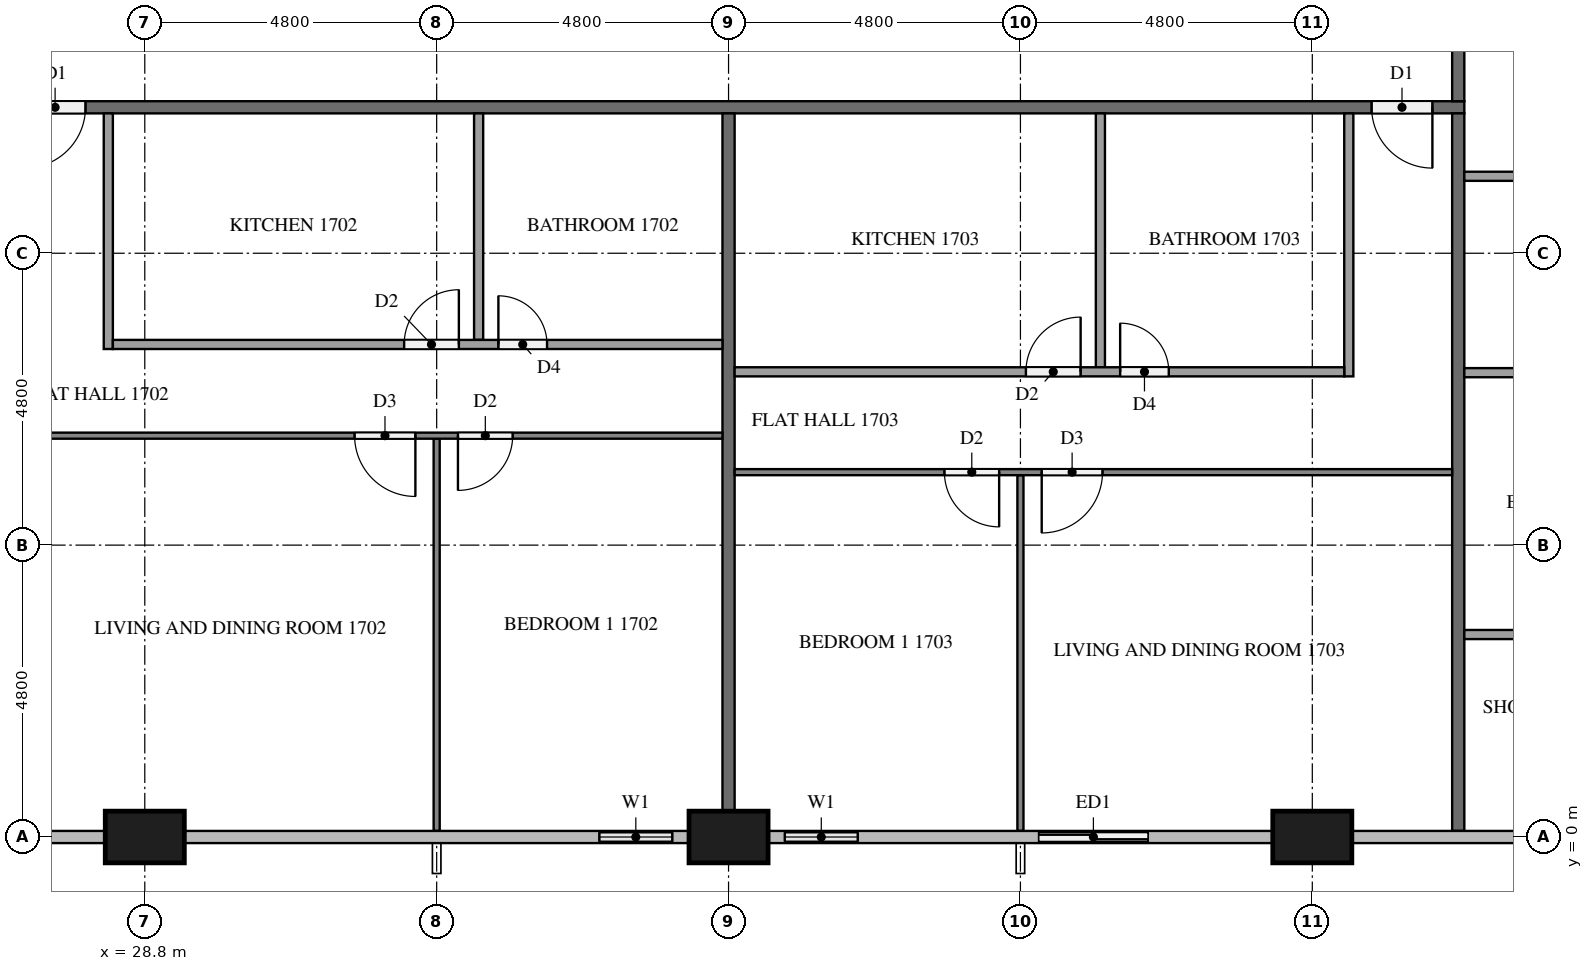
"""IFC4 building model, lengths in metres.
Left out: names, types, materials, properties, quantities, classifications, styles, units other than length and angle.
Written with IfcOpenShell. Run it as: python <this file> out.ifc"""

import sys

from ifc_helpers import new_model, si_unit, direction, frame, frame_2d, origin, origin_2d, place, context, subcontext, project, spatial, rectangle, extrude, element, fill, save


model = new_model("IFC4")
c1 = context("Model", 3, precision=1e-05, world=origin(), true_north=direction((0.0, 1.0)))
c2 = subcontext(c1, "Body", "Model", "MODEL_VIEW")
j1 = project(units=[si_unit("LENGTHUNIT", "METRE"), si_unit("PLANEANGLEUNIT", "RADIAN")], contexts=[c1])
p1 = place(None, origin())
s1 = spatial("IfcSite", under=j1, at=p1, CompositionType="ELEMENT")
p2 = place(p1, origin())
s2 = spatial("IfcBuilding", under=s1, at=p2, CompositionType="ELEMENT")
p3 = place(p2, frame((0.0, 0.0, 69.8)))
s3 = spatial("IfcBuildingStorey", under=s2, at=p3, CompositionType="ELEMENT", Elevation=69.8)
for number, where, z_axis, x_axis in (
    (1, (28.8, 0.0, 0.0), (0.0, 0.0, 1.0), (1.0, 0.0, 0.0)),
    (2, (38.4, 0.0, 0.0), (0.0, 0.0, 1.0), (1.0, 0.0, 0.0)),
    (3, (48.0, 0.0, 0.0), (0.0, 0.0, 1.0), (1.0, 0.0, 0.0)),
):
    element("IfcColumn", number, at=place(p3, frame(where, z_axis=z_axis, x_axis=x_axis)), inside=s3, PredefinedType="COLUMN", context=c2, shape_type="SweptSolid", body=[
        extrude(rectangle(XDim=1.3, YDim=0.85, at=origin_2d()), origin(), (0.0, 0.0, 1.0), 3.2),
    ])
p4 = place(p3, frame((36.0, 0.0, 0.0), z_axis=(0.0, 0.0, 1.0), x_axis=(1.0, 0.0, 0.0)))
e4 = element("IfcWall", 4, at=p4, inside=s3, PredefinedType="SOLIDWALL", context=c2, shape_type="SweptSolid", body=[
    extrude(rectangle(XDim=1.75, YDim=0.15, at=frame_2d((0.875, 0.0))), origin(), (0.0, 0.0, 1.0), 3.2),
])
p5 = place(p4, frame((0.275, 0.0, 0.9)))
e5 = element("IfcOpeningElement", 5, at=p5, cuts=e4, PredefinedType="OPENING", context=c2, shape_type="SweptSolid", body=[
    extrude(rectangle(XDim=1.2, YDim=1.4, at=frame_2d((0.6, 0.7))), frame((0.0, 0.085, 0.0), z_axis=(0.0, -1.0, 0.0), x_axis=(1.0, 0.0, 0.0)), (0.0, 0.0, 1.0), 0.17),
])
p6 = place(p3, frame((39.05, 0.0, 0.0), z_axis=(0.0, 0.0, 1.0), x_axis=(1.0, 0.0, 0.0)))
e6 = element("IfcWall", 6, at=p6, inside=s3, PredefinedType="SOLIDWALL", context=c2, shape_type="SweptSolid", body=[
    extrude(rectangle(XDim=1.75, YDim=0.15, at=frame_2d((0.875, 0.0))), origin(), (0.0, 0.0, 1.0), 3.2),
])
p7 = place(p6, frame((0.275, 0.0, 0.9)))
e7 = element("IfcOpeningElement", 7, at=p7, cuts=e6, PredefinedType="OPENING", context=c2, shape_type="SweptSolid", body=[
    extrude(rectangle(XDim=1.2, YDim=1.4, at=frame_2d((0.6, 0.7))), frame((0.0, 0.085, 0.0), z_axis=(0.0, -1.0, 0.0), x_axis=(1.0, 0.0, 0.0)), (0.0, 0.0, 1.0), 0.17),
])
p8 = place(p3, frame((43.2, 0.0, 0.0), z_axis=(0.0, 0.0, 1.0), x_axis=(1.0, 0.0, 0.0)))
e8 = element("IfcWall", 8, at=p8, inside=s3, PredefinedType="SOLIDWALL", context=c2, shape_type="SweptSolid", body=[
    extrude(rectangle(XDim=2.4, YDim=0.15, at=frame_2d((1.2, 0.0))), origin(), (0.0, 0.0, 1.0), 3.2),
])
p9 = place(p8, frame((0.3, 0.0, 0.0)))
e9 = element("IfcOpeningElement", 9, at=p9, cuts=e8, PredefinedType="OPENING", context=c2, shape_type="SweptSolid", body=[
    extrude(rectangle(XDim=1.8, YDim=2.4, at=frame_2d((0.9, 1.2))), frame((0.0, 0.085, 0.0), z_axis=(0.0, -1.0, 0.0), x_axis=(1.0, 0.0, 0.0)), (0.0, 0.0, 1.0), 0.17),
])
p10 = place(p3, frame((50.5, 12.0, 0.0), z_axis=(0.0, 0.0, 1.0), x_axis=(-1.0, 0.0, 0.0)))
e10 = element("IfcWall", 10, at=p10, inside=s3, PredefinedType="PARTITIONING", context=c2, shape_type="SweptSolid", body=[
    extrude(rectangle(XDim=38.6, YDim=0.2, at=frame_2d((19.3, 0.0))), origin(), (0.0, 0.0, 1.0), 3.2),
])
p11 = place(p10, frame((37.075, 0.0, 0.0)))
e11 = element("IfcOpeningElement", 11, at=p11, cuts=e10, PredefinedType="OPENING", context=c2, shape_type="SweptSolid", body=[
    extrude(rectangle(XDim=1.0, YDim=2.1, at=frame_2d((0.5, 1.05))), frame((0.0, 0.11, 0.0), z_axis=(0.0, -1.0, 0.0), x_axis=(1.0, 0.0, 0.0)), (0.0, 0.0, 1.0), 0.22),
])
p12 = place(p10, frame((22.675, 0.0, 0.0)))
e12 = element("IfcOpeningElement", 12, at=p12, cuts=e10, PredefinedType="OPENING", context=c2, shape_type="SweptSolid", body=[
    extrude(rectangle(XDim=1.0, YDim=2.1, at=frame_2d((0.5, 1.05))), frame((0.0, 0.11, 0.0), z_axis=(0.0, -1.0, 0.0), x_axis=(1.0, 0.0, 0.0)), (0.0, 0.0, 1.0), 0.22),
])
p13 = place(p10, frame((0.525, 0.0, 0.0)))
e13 = element("IfcOpeningElement", 13, at=p13, cuts=e10, PredefinedType="OPENING", context=c2, shape_type="SweptSolid", body=[
    extrude(rectangle(XDim=1.0, YDim=2.1, at=frame_2d((0.5, 1.05))), frame((0.0, 0.11, 0.0), z_axis=(0.0, -1.0, 0.0), x_axis=(1.0, 0.0, 0.0)), (0.0, 0.0, 1.0), 0.22),
])
p14 = place(p3, frame((50.4, 40.7, 0.0), z_axis=(0.0, 0.0, 1.0), x_axis=(0.0, -1.0, 0.0)))
e14 = element("IfcWall", 14, at=p14, inside=s3, PredefinedType="PARTITIONING", context=c2, shape_type="SweptSolid", body=[
    extrude(rectangle(XDim=28.6, YDim=0.2, at=frame_2d((14.3, 0.0))), origin(), (0.0, 0.0, 1.0), 3.2),
])
p15 = place(p14, frame((21.875, 0.0, 0.0)))
e15 = element("IfcOpeningElement", 15, at=p15, cuts=e14, PredefinedType="OPENING", context=c2, shape_type="SweptSolid", body=[
    extrude(rectangle(XDim=1.1, YDim=2.1, at=frame_2d((0.55, 1.05))), frame((0.0, 0.11, 0.0), z_axis=(0.0, -1.0, 0.0), x_axis=(1.0, 0.0, 0.0)), (0.0, 0.0, 1.0), 0.22),
])
p16 = place(p14, frame((20.075, 0.0, 0.0)))
e16 = element("IfcOpeningElement", 16, at=p16, cuts=e14, PredefinedType="OPENING", context=c2, shape_type="SweptSolid", body=[
    extrude(rectangle(XDim=1.0, YDim=2.1, at=frame_2d((0.5, 1.05))), frame((0.0, 0.11, 0.0), z_axis=(0.0, -1.0, 0.0), x_axis=(1.0, 0.0, 0.0)), (0.0, 0.0, 1.0), 0.22),
])
p17 = place(p14, frame((5.675, 0.0, 0.0)))
e17 = element("IfcOpeningElement", 17, at=p17, cuts=e14, PredefinedType="OPENING", context=c2, shape_type="SweptSolid", body=[
    extrude(rectangle(XDim=1.0, YDim=2.1, at=frame_2d((0.5, 1.05))), frame((0.0, 0.11, 0.0), z_axis=(0.0, -1.0, 0.0), x_axis=(1.0, 0.0, 0.0)), (0.0, 0.0, 1.0), 0.22),
])
p18 = place(p3, frame((38.4, 11.9, 0.0), z_axis=(0.0, 0.0, 1.0), x_axis=(0.0, -1.0, 0.0)))
e18 = element("IfcWall", 18, at=p18, inside=s3, PredefinedType="PARTITIONING", context=c2, shape_type="SweptSolid", body=[
    extrude(rectangle(XDim=11.475, YDim=0.2, at=frame_2d((5.737, 0.0))), origin(), (0.0, 0.0, 1.0), 3.2),
])
p19 = place(p3, frame((50.4, 11.9, 0.0), z_axis=(0.0, 0.0, 1.0), x_axis=(0.0, -1.0, 0.0)))
e19 = element("IfcWall", 19, at=p19, inside=s3, PredefinedType="PARTITIONING", context=c2, shape_type="SweptSolid", body=[
    extrude(rectangle(XDim=11.8, YDim=0.2, at=frame_2d((5.9, 0.0))), origin(), (0.0, 0.0, 1.0), 3.2),
])
p20 = place(p3, frame((33.6, 6.55, 0.0), z_axis=(0.0, 0.0, 1.0), x_axis=(0.0, -1.0, 0.0)))
e20 = element("IfcWall", 20, at=p20, inside=s3, PredefinedType="PARTITIONING", context=c2, shape_type="SweptSolid", body=[
    extrude(rectangle(XDim=6.45, YDim=0.1, at=frame_2d((3.225, 0.0))), origin(), (0.0, 0.0, 1.0), 3.2),
])
p21 = place(p3, frame((38.3, 6.6, 0.0), z_axis=(0.0, 0.0, 1.0), x_axis=(-1.0, 0.0, 0.0)))
e21 = element("IfcWall", 21, at=p21, inside=s3, PredefinedType="PARTITIONING", context=c2, shape_type="SweptSolid", body=[
    extrude(rectangle(XDim=11.8, YDim=0.1, at=frame_2d((5.9, 0.0))), origin(), (0.0, 0.0, 1.0), 3.2),
])
p22 = place(p21, frame((5.05, 0.0, 0.0)))
e22 = element("IfcOpeningElement", 22, at=p22, cuts=e21, PredefinedType="OPENING", context=c2, shape_type="SweptSolid", body=[
    extrude(rectangle(XDim=1.0, YDim=2.1, at=frame_2d((0.5, 1.05))), frame((0.0, 0.06, 0.0), z_axis=(0.0, -1.0, 0.0), x_axis=(1.0, 0.0, 0.0)), (0.0, 0.0, 1.0), 0.12),
])
p23 = place(p21, frame((3.45, 0.0, 0.0)))
e23 = element("IfcOpeningElement", 23, at=p23, cuts=e21, PredefinedType="OPENING", context=c2, shape_type="SweptSolid", body=[
    extrude(rectangle(XDim=0.9, YDim=2.1, at=frame_2d((0.45, 1.05))), frame((0.0, 0.06, 0.0), z_axis=(0.0, -1.0, 0.0), x_axis=(1.0, 0.0, 0.0)), (0.0, 0.0, 1.0), 0.12),
])
p24 = place(p3, frame((34.29, 11.9, 0.0), z_axis=(0.0, 0.0, 1.0), x_axis=(0.0, -1.0, 0.0)))
e24 = element("IfcWall", 24, at=p24, inside=s3, PredefinedType="PARTITIONING", context=c2, shape_type="SweptSolid", body=[
    extrude(rectangle(XDim=3.725, YDim=0.15, at=frame_2d((1.862, 0.0))), origin(), (0.0, 0.0, 1.0), 3.2),
])
p25 = place(p3, frame((28.2, 11.9, 0.0), z_axis=(0.0, 0.0, 1.0), x_axis=(0.0, -1.0, 0.0)))
e25 = element("IfcWall", 25, at=p25, inside=s3, PredefinedType="PARTITIONING", context=c2, shape_type="SweptSolid", body=[
    extrude(rectangle(XDim=3.875, YDim=0.15, at=frame_2d((1.938, 0.0))), origin(), (0.0, 0.0, 1.0), 3.2),
])
p26 = place(p3, frame((28.275, 8.1, 0.0), z_axis=(0.0, 0.0, 1.0), x_axis=(1.0, 0.0, 0.0)))
e26 = element("IfcWall", 26, at=p26, inside=s3, PredefinedType="PARTITIONING", context=c2, shape_type="SweptSolid", body=[
    extrude(rectangle(XDim=10.025, YDim=0.15, at=frame_2d((5.013, 0.0))), origin(), (0.0, 0.0, 1.0), 3.2),
])
p27 = place(p26, frame((4.79, 0.0, 0.0)))
e27 = element("IfcOpeningElement", 27, at=p27, cuts=e26, PredefinedType="OPENING", context=c2, shape_type="SweptSolid", body=[
    extrude(rectangle(XDim=0.9, YDim=2.1, at=frame_2d((0.45, 1.05))), frame((0.0, 0.085, 0.0), z_axis=(0.0, -1.0, 0.0), x_axis=(1.0, 0.0, 0.0)), (0.0, 0.0, 1.0), 0.17),
])
p28 = place(p26, frame((6.34, 0.0, 0.0)))
e28 = element("IfcOpeningElement", 28, at=p28, cuts=e26, PredefinedType="OPENING", context=c2, shape_type="SweptSolid", body=[
    extrude(rectangle(XDim=0.8, YDim=2.1, at=frame_2d((0.4, 1.05))), frame((0.0, 0.085, 0.0), z_axis=(0.0, -1.0, 0.0), x_axis=(1.0, 0.0, 0.0)), (0.0, 0.0, 1.0), 0.17),
])
p29 = place(p3, frame((43.2, 5.95, 0.0), z_axis=(0.0, 0.0, 1.0), x_axis=(0.0, -1.0, 0.0)))
e29 = element("IfcWall", 29, at=p29, inside=s3, PredefinedType="PARTITIONING", context=c2, shape_type="SweptSolid", body=[
    extrude(rectangle(XDim=5.85, YDim=0.1, at=frame_2d((2.925, 0.0))), origin(), (0.0, 0.0, 1.0), 3.2),
])
p30 = place(p3, frame((50.3, 6.0, 0.0), z_axis=(0.0, 0.0, 1.0), x_axis=(-1.0, 0.0, 0.0)))
e30 = element("IfcWall", 30, at=p30, inside=s3, PredefinedType="PARTITIONING", context=c2, shape_type="SweptSolid", body=[
    extrude(rectangle(XDim=11.8, YDim=0.1, at=frame_2d((5.9, 0.0))), origin(), (0.0, 0.0, 1.0), 3.2),
])
p31 = place(p30, frame((5.75, 0.0, 0.0)))
e31 = element("IfcOpeningElement", 31, at=p31, cuts=e30, PredefinedType="OPENING", context=c2, shape_type="SweptSolid", body=[
    extrude(rectangle(XDim=1.0, YDim=2.1, at=frame_2d((0.5, 1.05))), frame((0.0, 0.06, 0.0), z_axis=(0.0, -1.0, 0.0), x_axis=(1.0, 0.0, 0.0)), (0.0, 0.0, 1.0), 0.12),
])
p32 = place(p30, frame((7.45, 0.0, 0.0)))
e32 = element("IfcOpeningElement", 32, at=p32, cuts=e30, PredefinedType="OPENING", context=c2, shape_type="SweptSolid", body=[
    extrude(rectangle(XDim=0.9, YDim=2.1, at=frame_2d((0.45, 1.05))), frame((0.0, 0.06, 0.0), z_axis=(0.0, -1.0, 0.0), x_axis=(1.0, 0.0, 0.0)), (0.0, 0.0, 1.0), 0.12),
])
p33 = place(p3, frame((44.515, 11.9, 0.0), z_axis=(0.0, 0.0, 1.0), x_axis=(0.0, -1.0, 0.0)))
e33 = element("IfcWall", 33, at=p33, inside=s3, PredefinedType="PARTITIONING", context=c2, shape_type="SweptSolid", body=[
    extrude(rectangle(XDim=4.175, YDim=0.15, at=frame_2d((2.087, 0.0))), origin(), (0.0, 0.0, 1.0), 3.2),
])
p34 = place(p3, frame((48.6, 11.9, 0.0), z_axis=(0.0, 0.0, 1.0), x_axis=(0.0, -1.0, 0.0)))
e34 = element("IfcWall", 34, at=p34, inside=s3, PredefinedType="PARTITIONING", context=c2, shape_type="SweptSolid", body=[
    extrude(rectangle(XDim=4.325, YDim=0.15, at=frame_2d((2.163, 0.0))), origin(), (0.0, 0.0, 1.0), 3.2),
])
p35 = place(p3, frame((38.5, 7.65, 0.0), z_axis=(0.0, 0.0, 1.0), x_axis=(1.0, 0.0, 0.0)))
e35 = element("IfcWall", 35, at=p35, inside=s3, PredefinedType="PARTITIONING", context=c2, shape_type="SweptSolid", body=[
    extrude(rectangle(XDim=10.025, YDim=0.15, at=frame_2d((5.012, 0.0))), origin(), (0.0, 0.0, 1.0), 3.2),
])
p36 = place(p35, frame((6.34, 0.0, 0.0)))
e36 = element("IfcOpeningElement", 36, at=p36, cuts=e35, PredefinedType="OPENING", context=c2, shape_type="SweptSolid", body=[
    extrude(rectangle(XDim=0.8, YDim=2.1, at=frame_2d((0.4, 1.05))), frame((0.0, 0.085, 0.0), z_axis=(0.0, -1.0, 0.0), x_axis=(1.0, 0.0, 0.0)), (0.0, 0.0, 1.0), 0.17),
])
p37 = place(p35, frame((4.79, 0.0, 0.0)))
e37 = element("IfcOpeningElement", 37, at=p37, cuts=e35, PredefinedType="OPENING", context=c2, shape_type="SweptSolid", body=[
    extrude(rectangle(XDim=0.9, YDim=2.1, at=frame_2d((0.45, 1.05))), frame((0.0, 0.085, 0.0), z_axis=(0.0, -1.0, 0.0), x_axis=(1.0, 0.0, 0.0)), (0.0, 0.0, 1.0), 0.17),
])
for number, where, z_axis, x_axis in (
    (38, (50.5, 10.865, 0.0), (0.0, 0.0, 1.0), (1.0, 0.0, 0.0)),
    (39, (50.5, 7.636, 0.0), (0.0, 0.0, 1.0), (1.0, 0.0, 0.0)),
    (40, (50.5, 3.33, 0.0), (0.0, 0.0, 1.0), (1.0, 0.0, 0.0)),
):
    element("IfcWall", number, at=place(p3, frame(where, z_axis=z_axis, x_axis=x_axis)), inside=s3, PredefinedType="PARTITIONING", context=c2, shape_type="SweptSolid", body=[
        extrude(rectangle(XDim=3.875, YDim=0.15, at=frame_2d((1.938, 0.0))), origin(), (0.0, 0.0, 1.0), 3.2),
    ])
p38 = place(p5, origin())
e41 = element("IfcWindow", 41, at=p38, inside=s3, PartitioningType="SINGLE_PANEL", PredefinedType="WINDOW", context=c2, shape_type="SweptSolid", body=[
    extrude(rectangle(XDim=1.2, YDim=1.4, at=frame_2d((0.6, 0.7))), frame((0.0, 0.03, 0.0), z_axis=(0.0, -1.0, 0.0), x_axis=(1.0, 0.0, 0.0)), (0.0, 0.0, 1.0), 0.06),
])
fill(e5, e41)
p39 = place(p7, origin())
e42 = element("IfcWindow", 42, at=p39, inside=s3, PartitioningType="SINGLE_PANEL", PredefinedType="WINDOW", context=c2, shape_type="SweptSolid", body=[
    extrude(rectangle(XDim=1.2, YDim=1.4, at=frame_2d((0.6, 0.7))), frame((0.0, 0.03, 0.0), z_axis=(0.0, -1.0, 0.0), x_axis=(1.0, 0.0, 0.0)), (0.0, 0.0, 1.0), 0.06),
])
fill(e7, e42)
p40 = place(p9, origin())
e43 = element("IfcDoor", 43, at=p40, inside=s3, OperationType="SLIDING_TO_RIGHT", PredefinedType="DOOR", context=c2, shape_type="SweptSolid", body=[
    extrude(rectangle(XDim=1.8, YDim=2.4, at=frame_2d((0.9, 1.2))), frame((0.0, 0.025, 0.0), z_axis=(0.0, -1.0, 0.0), x_axis=(1.0, 0.0, 0.0)), (0.0, 0.0, 1.0), 0.05),
])
fill(e9, e43)
p41 = place(p12, origin())
e44 = element("IfcDoor", 44, at=p41, inside=s3, OperationType="SINGLE_SWING_RIGHT", PredefinedType="DOOR", context=c2, shape_type="SweptSolid", body=[
    extrude(rectangle(XDim=1.0, YDim=2.1, at=frame_2d((0.5, 1.05))), frame((0.0, 0.025, 0.0), z_axis=(0.0, -1.0, 0.0), x_axis=(1.0, 0.0, 0.0)), (0.0, 0.0, 1.0), 0.05),
])
fill(e12, e44)
p42 = place(p13, origin())
e45 = element("IfcDoor", 45, at=p42, inside=s3, OperationType="SINGLE_SWING_LEFT", PredefinedType="DOOR", context=c2, shape_type="SweptSolid", body=[
    extrude(rectangle(XDim=1.0, YDim=2.1, at=frame_2d((0.5, 1.05))), frame((0.0, 0.025, 0.0), z_axis=(0.0, -1.0, 0.0), x_axis=(1.0, 0.0, 0.0)), (0.0, 0.0, 1.0), 0.05),
])
fill(e13, e45)
p43 = place(p22, origin())
e46 = element("IfcDoor", 46, at=p43, inside=s3, OperationType="SINGLE_SWING_LEFT", PredefinedType="DOOR", context=c2, shape_type="SweptSolid", body=[
    extrude(rectangle(XDim=1.0, YDim=2.1, at=frame_2d((0.5, 1.05))), frame((0.0, 0.025, 0.0), z_axis=(0.0, -1.0, 0.0), x_axis=(1.0, 0.0, 0.0)), (0.0, 0.0, 1.0), 0.05),
])
fill(e22, e46)
p44 = place(p23, origin())
e47 = element("IfcDoor", 47, at=p44, inside=s3, OperationType="SINGLE_SWING_RIGHT", PredefinedType="DOOR", context=c2, shape_type="SweptSolid", body=[
    extrude(rectangle(XDim=0.9, YDim=2.1, at=frame_2d((0.45, 1.05))), frame((0.0, 0.025, 0.0), z_axis=(0.0, -1.0, 0.0), x_axis=(1.0, 0.0, 0.0)), (0.0, 0.0, 1.0), 0.05),
])
fill(e23, e47)
p45 = place(p27, origin())
e48 = element("IfcDoor", 48, at=p45, inside=s3, OperationType="SINGLE_SWING_RIGHT", PredefinedType="DOOR", context=c2, shape_type="SweptSolid", body=[
    extrude(rectangle(XDim=0.9, YDim=2.1, at=frame_2d((0.45, 1.05))), frame((0.0, 0.025, 0.0), z_axis=(0.0, -1.0, 0.0), x_axis=(1.0, 0.0, 0.0)), (0.0, 0.0, 1.0), 0.05),
])
fill(e27, e48)
p46 = place(p28, origin())
e49 = element("IfcDoor", 49, at=p46, inside=s3, OperationType="SINGLE_SWING_LEFT", PredefinedType="DOOR", context=c2, shape_type="SweptSolid", body=[
    extrude(rectangle(XDim=0.8, YDim=2.1, at=frame_2d((0.4, 1.05))), frame((0.0, 0.025, 0.0), z_axis=(0.0, -1.0, 0.0), x_axis=(1.0, 0.0, 0.0)), (0.0, 0.0, 1.0), 0.05),
])
fill(e28, e49)
p47 = place(p31, origin())
e50 = element("IfcDoor", 50, at=p47, inside=s3, OperationType="SINGLE_SWING_RIGHT", PredefinedType="DOOR", context=c2, shape_type="SweptSolid", body=[
    extrude(rectangle(XDim=1.0, YDim=2.1, at=frame_2d((0.5, 1.05))), frame((0.0, 0.025, 0.0), z_axis=(0.0, -1.0, 0.0), x_axis=(1.0, 0.0, 0.0)), (0.0, 0.0, 1.0), 0.05),
])
fill(e31, e50)
p48 = place(p32, origin())
e51 = element("IfcDoor", 51, at=p48, inside=s3, OperationType="SINGLE_SWING_LEFT", PredefinedType="DOOR", context=c2, shape_type="SweptSolid", body=[
    extrude(rectangle(XDim=0.9, YDim=2.1, at=frame_2d((0.45, 1.05))), frame((0.0, 0.025, 0.0), z_axis=(0.0, -1.0, 0.0), x_axis=(1.0, 0.0, 0.0)), (0.0, 0.0, 1.0), 0.05),
])
fill(e32, e51)
p49 = place(p36, origin())
e52 = element("IfcDoor", 52, at=p49, inside=s3, OperationType="SINGLE_SWING_LEFT", PredefinedType="DOOR", context=c2, shape_type="SweptSolid", body=[
    extrude(rectangle(XDim=0.8, YDim=2.1, at=frame_2d((0.4, 1.05))), frame((0.0, 0.025, 0.0), z_axis=(0.0, -1.0, 0.0), x_axis=(1.0, 0.0, 0.0)), (0.0, 0.0, 1.0), 0.05),
])
fill(e36, e52)
p50 = place(p37, origin())
e53 = element("IfcDoor", 53, at=p50, inside=s3, OperationType="SINGLE_SWING_RIGHT", PredefinedType="DOOR", context=c2, shape_type="SweptSolid", body=[
    extrude(rectangle(XDim=0.9, YDim=2.1, at=frame_2d((0.45, 1.05))), frame((0.0, 0.025, 0.0), z_axis=(0.0, -1.0, 0.0), x_axis=(1.0, 0.0, 0.0)), (0.0, 0.0, 1.0), 0.05),
])
fill(e37, e53)
save(model, sys.argv[1])
